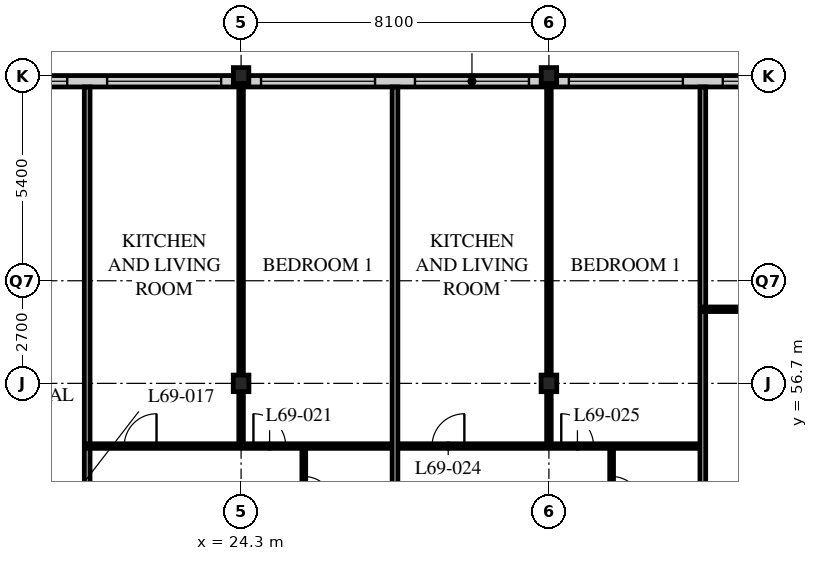
"""IFC4 building model, lengths in metres.
Left out: names, types, materials, properties, quantities, classifications, styles, units other than length and angle.
Written with IfcOpenShell. Run it as: python <this file> out.ifc"""

import sys

from ifc_helpers import new_model, si_unit, direction, frame, frame_2d, origin, origin_2d, place, context, subcontext, project, spatial, rectangle, i_section, extrude, element, fill, save


model = new_model("IFC4")
c1 = context("Model", 3, precision=1e-05, world=origin(), true_north=direction((0.0, 1.0)))
c2 = subcontext(c1, "Body", "Model", "MODEL_VIEW")
j1 = project(units=[si_unit("LENGTHUNIT", "METRE"), si_unit("PLANEANGLEUNIT", "RADIAN")], contexts=[c1])
p1 = place(None, origin())
s1 = spatial("IfcSite", under=j1, at=p1, CompositionType="ELEMENT")
p2 = place(p1, origin())
s2 = spatial("IfcBuilding", under=s1, at=p2, CompositionType="ELEMENT")
p3 = place(p2, frame((0.0, 0.0, 269.7)))
s3 = spatial("IfcBuildingStorey", under=s2, at=p3, CompositionType="ELEMENT", Elevation=269.7)
p4 = place(p3, frame((24.3, 56.7, 0.0), z_axis=(0.0, 0.0, 1.0), x_axis=(1.0, 0.0, 0.0)))
e1 = element("IfcColumn", 1, at=p4, inside=s3, PredefinedType="COLUMN", context=c2, shape_type="SweptSolid", body=[
    extrude(i_section(OverallWidth=0.412, OverallDepth=0.437, WebThickness=0.036, FlangeThickness=0.058, FilletRadius=0.015, at=origin_2d()), origin(), (0.0, 0.0, 1.0), 3.9),
])
p5 = place(p3, frame((24.3, 64.8, 0.0), z_axis=(0.0, 0.0, 1.0), x_axis=(1.0, 0.0, 0.0)))
e2 = element("IfcColumn", 2, at=p5, inside=s3, PredefinedType="COLUMN", context=c2, shape_type="SweptSolid", body=[
    extrude(i_section(OverallWidth=0.407, OverallDepth=0.419, WebThickness=0.031, FlangeThickness=0.049, FilletRadius=0.015, at=origin_2d()), origin(), (0.0, 0.0, 1.0), 3.9),
])
p6 = place(p3, frame((32.4, 56.7, 0.0), z_axis=(0.0, 0.0, 1.0), x_axis=(1.0, 0.0, 0.0)))
e3 = element("IfcColumn", 3, at=p6, inside=s3, PredefinedType="COLUMN", context=c2, shape_type="SweptSolid", body=[
    extrude(i_section(OverallWidth=0.412, OverallDepth=0.437, WebThickness=0.036, FlangeThickness=0.058, FilletRadius=0.015, at=origin_2d()), origin(), (0.0, 0.0, 1.0), 3.9),
])
p7 = place(p3, frame((32.4, 64.8, 0.0), z_axis=(0.0, 0.0, 1.0), x_axis=(1.0, 0.0, 0.0)))
e4 = element("IfcColumn", 4, at=p7, inside=s3, PredefinedType="COLUMN", context=c2, shape_type="SweptSolid", body=[
    extrude(i_section(OverallWidth=0.407, OverallDepth=0.419, WebThickness=0.031, FlangeThickness=0.049, FilletRadius=0.015, at=origin_2d()), origin(), (0.0, 0.0, 1.0), 3.9),
])
p8 = place(p3, frame((48.3, 64.65, 0.0), z_axis=(0.0, 0.0, 1.0), x_axis=(-1.0, 0.0, 0.0)))
e5 = element("IfcWall", 5, at=p8, inside=s3, PredefinedType="SOLIDWALL", context=c2, shape_type="SweptSolid", body=[
    extrude(rectangle(XDim=40.2, YDim=0.3, at=frame_2d((20.1, 0.0))), origin(), (0.0, 0.0, 1.0), 3.69),
])
p9 = place(p8, frame((0.225, 0.0, 0.6)))
e6 = element("IfcOpeningElement", 6, at=p9, cuts=e5, PredefinedType="OPENING", context=c2, shape_type="SweptSolid", body=[
    extrude(rectangle(XDim=3.0, YDim=2.4, at=frame_2d((1.5, 1.2))), frame((0.0, 0.16, 0.0), z_axis=(0.0, -1.0, 0.0), x_axis=(1.0, 0.0, 0.0)), (0.0, 0.0, 1.0), 0.32),
])
p10 = place(p8, frame((4.275, 0.0, 0.6)))
e7 = element("IfcOpeningElement", 7, at=p10, cuts=e5, PredefinedType="OPENING", context=c2, shape_type="SweptSolid", body=[
    extrude(rectangle(XDim=3.0, YDim=2.4, at=frame_2d((1.5, 1.2))), frame((0.0, 0.16, 0.0), z_axis=(0.0, -1.0, 0.0), x_axis=(1.0, 0.0, 0.0)), (0.0, 0.0, 1.0), 0.32),
])
p11 = place(p8, frame((8.325, 0.0, 0.6)))
e8 = element("IfcOpeningElement", 8, at=p11, cuts=e5, PredefinedType="OPENING", context=c2, shape_type="SweptSolid", body=[
    extrude(rectangle(XDim=3.0, YDim=2.4, at=frame_2d((1.5, 1.2))), frame((0.0, 0.16, 0.0), z_axis=(0.0, -1.0, 0.0), x_axis=(1.0, 0.0, 0.0)), (0.0, 0.0, 1.0), 0.32),
])
p12 = place(p8, frame((12.375, 0.0, 0.6)))
e9 = element("IfcOpeningElement", 9, at=p12, cuts=e5, PredefinedType="OPENING", context=c2, shape_type="SweptSolid", body=[
    extrude(rectangle(XDim=3.0, YDim=2.4, at=frame_2d((1.5, 1.2))), frame((0.0, 0.16, 0.0), z_axis=(0.0, -1.0, 0.0), x_axis=(1.0, 0.0, 0.0)), (0.0, 0.0, 1.0), 0.32),
])
p13 = place(p8, frame((16.425, 0.0, 0.6)))
e10 = element("IfcOpeningElement", 10, at=p13, cuts=e5, PredefinedType="OPENING", context=c2, shape_type="SweptSolid", body=[
    extrude(rectangle(XDim=3.0, YDim=2.4, at=frame_2d((1.5, 1.2))), frame((0.0, 0.16, 0.0), z_axis=(0.0, -1.0, 0.0), x_axis=(1.0, 0.0, 0.0)), (0.0, 0.0, 1.0), 0.32),
])
p14 = place(p8, frame((20.475, 0.0, 0.6)))
e11 = element("IfcOpeningElement", 11, at=p14, cuts=e5, PredefinedType="OPENING", context=c2, shape_type="SweptSolid", body=[
    extrude(rectangle(XDim=3.0, YDim=2.4, at=frame_2d((1.5, 1.2))), frame((0.0, 0.16, 0.0), z_axis=(0.0, -1.0, 0.0), x_axis=(1.0, 0.0, 0.0)), (0.0, 0.0, 1.0), 0.32),
])
p15 = place(p8, frame((24.525, 0.0, 0.6)))
e12 = element("IfcOpeningElement", 12, at=p15, cuts=e5, PredefinedType="OPENING", context=c2, shape_type="SweptSolid", body=[
    extrude(rectangle(XDim=3.0, YDim=2.4, at=frame_2d((1.5, 1.2))), frame((0.0, 0.16, 0.0), z_axis=(0.0, -1.0, 0.0), x_axis=(1.0, 0.0, 0.0)), (0.0, 0.0, 1.0), 0.32),
])
p16 = place(p8, frame((28.575, 0.0, 0.6)))
e13 = element("IfcOpeningElement", 13, at=p16, cuts=e5, PredefinedType="OPENING", context=c2, shape_type="SweptSolid", body=[
    extrude(rectangle(XDim=3.0, YDim=2.4, at=frame_2d((1.5, 1.2))), frame((0.0, 0.16, 0.0), z_axis=(0.0, -1.0, 0.0), x_axis=(1.0, 0.0, 0.0)), (0.0, 0.0, 1.0), 0.32),
])
p17 = place(p8, frame((32.625, 0.0, 0.6)))
e14 = element("IfcOpeningElement", 14, at=p17, cuts=e5, PredefinedType="OPENING", context=c2, shape_type="SweptSolid", body=[
    extrude(rectangle(XDim=3.0, YDim=2.4, at=frame_2d((1.5, 1.2))), frame((0.0, 0.16, 0.0), z_axis=(0.0, -1.0, 0.0), x_axis=(1.0, 0.0, 0.0)), (0.0, 0.0, 1.0), 0.32),
])
p18 = place(p8, frame((36.675, 0.0, 0.6)))
e15 = element("IfcOpeningElement", 15, at=p18, cuts=e5, PredefinedType="OPENING", context=c2, shape_type="SweptSolid", body=[
    extrude(rectangle(XDim=3.0, YDim=2.4, at=frame_2d((1.5, 1.2))), frame((0.0, 0.16, 0.0), z_axis=(0.0, -1.0, 0.0), x_axis=(1.0, 0.0, 0.0)), (0.0, 0.0, 1.0), 0.32),
])
p19 = place(p3, frame((20.25, 52.65, 0.0), z_axis=(0.0, 0.0, 1.0), x_axis=(0.0, 1.0, 0.0)))
e16 = element("IfcWall", 16, at=p19, inside=s3, PredefinedType="PARTITIONING", context=c2, shape_type="SweptSolid", body=[
    extrude(rectangle(XDim=11.85, YDim=0.15, at=frame_2d((5.925, 0.0))), origin(), (0.0, 0.0, 1.0), 3.69),
])
p20 = place(p3, frame((20.25, 55.05, 0.0), z_axis=(0.0, 0.0, 1.0), x_axis=(1.0, 0.0, 0.0)))
e17 = element("IfcWall", 17, at=p20, inside=s3, PredefinedType="PARTITIONING", context=c2, shape_type="SweptSolid", body=[
    extrude(rectangle(XDim=16.2, YDim=0.12, at=frame_2d((8.1, 0.0))), origin(), (0.0, 0.0, 1.0), 3.69),
])
p21 = place(p20, frame((0.975, 0.0, 0.0)))
e18 = element("IfcOpeningElement", 18, at=p21, cuts=e17, PredefinedType="OPENING", context=c2, shape_type="SweptSolid", body=[
    extrude(rectangle(XDim=0.85, YDim=2.1, at=frame_2d((0.425, 1.05))), frame((0.0, 0.07, 0.0), z_axis=(0.0, -1.0, 0.0), x_axis=(1.0, 0.0, 0.0)), (0.0, 0.0, 1.0), 0.14),
])
p22 = place(p20, frame((4.375, 0.0, 0.0)))
e19 = element("IfcOpeningElement", 19, at=p22, cuts=e17, PredefinedType="OPENING", context=c2, shape_type="SweptSolid", body=[
    extrude(rectangle(XDim=0.85, YDim=2.1, at=frame_2d((0.425, 1.05))), frame((0.0, 0.07, 0.0), z_axis=(0.0, -1.0, 0.0), x_axis=(1.0, 0.0, 0.0)), (0.0, 0.0, 1.0), 0.14),
])
p23 = place(p20, frame((9.075, 0.0, 0.0)))
e20 = element("IfcOpeningElement", 20, at=p23, cuts=e17, PredefinedType="OPENING", context=c2, shape_type="SweptSolid", body=[
    extrude(rectangle(XDim=0.85, YDim=2.1, at=frame_2d((0.425, 1.05))), frame((0.0, 0.07, 0.0), z_axis=(0.0, -1.0, 0.0), x_axis=(1.0, 0.0, 0.0)), (0.0, 0.0, 1.0), 0.14),
])
p24 = place(p20, frame((12.475, 0.0, 0.0)))
e21 = element("IfcOpeningElement", 21, at=p24, cuts=e17, PredefinedType="OPENING", context=c2, shape_type="SweptSolid", body=[
    extrude(rectangle(XDim=0.85, YDim=2.1, at=frame_2d((0.425, 1.05))), frame((0.0, 0.07, 0.0), z_axis=(0.0, -1.0, 0.0), x_axis=(1.0, 0.0, 0.0)), (0.0, 0.0, 1.0), 0.14),
])
p25 = place(p3, frame((25.95, 52.65, 0.0), z_axis=(0.0, 0.0, 1.0), x_axis=(0.0, 1.0, 0.0)))
e22 = element("IfcWall", 22, at=p25, inside=s3, PredefinedType="PARTITIONING", context=c2, shape_type="SweptSolid", body=[
    extrude(rectangle(XDim=2.4, YDim=0.1, at=frame_2d((1.2, 0.0))), origin(), (0.0, 0.0, 1.0), 3.69),
])
p26 = place(p25, frame((0.8, 0.0, 0.0)))
e23 = element("IfcOpeningElement", 23, at=p26, cuts=e22, PredefinedType="OPENING", context=c2, shape_type="SweptSolid", body=[
    extrude(rectangle(XDim=0.8, YDim=2.1, at=frame_2d((0.4, 1.05))), frame((0.0, 0.06, 0.0), z_axis=(0.0, -1.0, 0.0), x_axis=(1.0, 0.0, 0.0)), (0.0, 0.0, 1.0), 0.12),
])
p27 = place(p3, frame((24.3, 55.05, 0.0), z_axis=(0.0, 0.0, 1.0), x_axis=(0.0, 1.0, 0.0)))
e24 = element("IfcWall", 24, at=p27, inside=s3, PredefinedType="PARTITIONING", context=c2, shape_type="SweptSolid", body=[
    extrude(rectangle(XDim=9.45, YDim=0.12, at=frame_2d((4.725, 0.0))), origin(), (0.0, 0.0, 1.0), 3.078),
])
p28 = place(p3, frame((28.35, 52.65, 0.0), z_axis=(0.0, 0.0, 1.0), x_axis=(0.0, 1.0, 0.0)))
e25 = element("IfcWall", 25, at=p28, inside=s3, PredefinedType="PARTITIONING", context=c2, shape_type="SweptSolid", body=[
    extrude(rectangle(XDim=11.85, YDim=0.15, at=frame_2d((5.925, 0.0))), origin(), (0.0, 0.0, 1.0), 3.69),
])
p29 = place(p3, frame((34.05, 52.65, 0.0), z_axis=(0.0, 0.0, 1.0), x_axis=(0.0, 1.0, 0.0)))
e26 = element("IfcWall", 26, at=p29, inside=s3, PredefinedType="PARTITIONING", context=c2, shape_type="SweptSolid", body=[
    extrude(rectangle(XDim=2.4, YDim=0.1, at=frame_2d((1.2, 0.0))), origin(), (0.0, 0.0, 1.0), 3.69),
])
p30 = place(p29, frame((0.8, 0.0, 0.0)))
e27 = element("IfcOpeningElement", 27, at=p30, cuts=e26, PredefinedType="OPENING", context=c2, shape_type="SweptSolid", body=[
    extrude(rectangle(XDim=0.8, YDim=2.1, at=frame_2d((0.4, 1.05))), frame((0.0, 0.06, 0.0), z_axis=(0.0, -1.0, 0.0), x_axis=(1.0, 0.0, 0.0)), (0.0, 0.0, 1.0), 0.12),
])
p31 = place(p3, frame((32.4, 55.05, 0.0), z_axis=(0.0, 0.0, 1.0), x_axis=(0.0, 1.0, 0.0)))
e28 = element("IfcWall", 28, at=p31, inside=s3, PredefinedType="PARTITIONING", context=c2, shape_type="SweptSolid", body=[
    extrude(rectangle(XDim=9.45, YDim=0.12, at=frame_2d((4.725, 0.0))), origin(), (0.0, 0.0, 1.0), 3.078),
])
p32 = place(p3, frame((36.45, 64.5, 0.0), z_axis=(0.0, 0.0, 1.0), x_axis=(0.0, -1.0, 0.0)))
e29 = element("IfcWall", 29, at=p32, inside=s3, PredefinedType="PARTITIONING", context=c2, shape_type="SweptSolid", body=[
    extrude(rectangle(XDim=11.85, YDim=0.15, at=frame_2d((5.925, 0.0))), origin(), (0.0, 0.0, 1.0), 3.69),
])
p33 = place(p3, frame((36.45, 58.65, 0.0), z_axis=(0.0, 0.0, 1.0), x_axis=(1.0, 0.0, 0.0)))
e30 = element("IfcWall", 30, at=p33, inside=s3, PredefinedType="PARTITIONING", context=c2, shape_type="SweptSolid", body=[
    extrude(rectangle(XDim=15.9, YDim=0.12, at=frame_2d((7.95, 0.0))), origin(), (0.0, 0.0, 1.0), 3.69),
])
p34 = place(p33, frame((1.675, 0.0, 0.0)))
e31 = element("IfcOpeningElement", 31, at=p34, cuts=e30, PredefinedType="OPENING", context=c2, shape_type="SweptSolid", body=[
    extrude(rectangle(XDim=0.85, YDim=2.1, at=frame_2d((0.425, 1.05))), frame((0.0, 0.07, 0.0), z_axis=(0.0, -1.0, 0.0), x_axis=(1.0, 0.0, 0.0)), (0.0, 0.0, 1.0), 0.14),
])
p35 = place(p11, origin())
e32 = element("IfcWindow", 32, at=p35, inside=s3, PartitioningType="SINGLE_PANEL", PredefinedType="WINDOW", context=c2, shape_type="SweptSolid", body=[
    extrude(rectangle(XDim=3.0, YDim=2.4, at=frame_2d((1.5, 1.2))), frame((0.0, 0.03, 0.0), z_axis=(0.0, -1.0, 0.0), x_axis=(1.0, 0.0, 0.0)), (0.0, 0.0, 1.0), 0.06),
])
fill(e8, e32)
p36 = place(p12, origin())
e33 = element("IfcWindow", 33, at=p36, inside=s3, PartitioningType="SINGLE_PANEL", PredefinedType="WINDOW", context=c2, shape_type="SweptSolid", body=[
    extrude(rectangle(XDim=3.0, YDim=2.4, at=frame_2d((1.5, 1.2))), frame((0.0, 0.03, 0.0), z_axis=(0.0, -1.0, 0.0), x_axis=(1.0, 0.0, 0.0)), (0.0, 0.0, 1.0), 0.06),
])
fill(e9, e33)
p37 = place(p13, origin())
e34 = element("IfcWindow", 34, at=p37, inside=s3, PartitioningType="SINGLE_PANEL", PredefinedType="WINDOW", context=c2, shape_type="SweptSolid", body=[
    extrude(rectangle(XDim=3.0, YDim=2.4, at=frame_2d((1.5, 1.2))), frame((0.0, 0.03, 0.0), z_axis=(0.0, -1.0, 0.0), x_axis=(1.0, 0.0, 0.0)), (0.0, 0.0, 1.0), 0.06),
])
fill(e10, e34)
p38 = place(p14, origin())
e35 = element("IfcWindow", 35, at=p38, inside=s3, PartitioningType="SINGLE_PANEL", PredefinedType="WINDOW", context=c2, shape_type="SweptSolid", body=[
    extrude(rectangle(XDim=3.0, YDim=2.4, at=frame_2d((1.5, 1.2))), frame((0.0, 0.03, 0.0), z_axis=(0.0, -1.0, 0.0), x_axis=(1.0, 0.0, 0.0)), (0.0, 0.0, 1.0), 0.06),
])
fill(e11, e35)
p39 = place(p15, origin())
e36 = element("IfcWindow", 36, at=p39, inside=s3, PartitioningType="SINGLE_PANEL", PredefinedType="WINDOW", context=c2, shape_type="SweptSolid", body=[
    extrude(rectangle(XDim=3.0, YDim=2.4, at=frame_2d((1.5, 1.2))), frame((0.0, 0.03, 0.0), z_axis=(0.0, -1.0, 0.0), x_axis=(1.0, 0.0, 0.0)), (0.0, 0.0, 1.0), 0.06),
])
fill(e12, e36)
p40 = place(p16, origin())
e37 = element("IfcWindow", 37, at=p40, inside=s3, PartitioningType="SINGLE_PANEL", PredefinedType="WINDOW", context=c2, shape_type="SweptSolid", body=[
    extrude(rectangle(XDim=3.0, YDim=2.4, at=frame_2d((1.5, 1.2))), frame((0.0, 0.03, 0.0), z_axis=(0.0, -1.0, 0.0), x_axis=(1.0, 0.0, 0.0)), (0.0, 0.0, 1.0), 0.06),
])
fill(e13, e37)
p41 = place(p26, origin())
e38 = element("IfcDoor", 38, at=p41, inside=s3, OperationType="SINGLE_SWING_RIGHT", PredefinedType="DOOR", context=c2, shape_type="SweptSolid", body=[
    extrude(rectangle(XDim=0.8, YDim=2.1, at=frame_2d((0.4, 1.05))), frame((0.0, 0.025, 0.0), z_axis=(0.0, -1.0, 0.0), x_axis=(1.0, 0.0, 0.0)), (0.0, 0.0, 1.0), 0.05),
])
fill(e23, e38)
p42 = place(p21, origin())
e39 = element("IfcDoor", 39, at=p42, inside=s3, OperationType="SINGLE_SWING_RIGHT", PredefinedType="DOOR", context=c2, shape_type="SweptSolid", body=[
    extrude(rectangle(XDim=0.85, YDim=2.1, at=frame_2d((0.425, 1.05))), frame((0.0, 0.025, 0.0), z_axis=(0.0, -1.0, 0.0), x_axis=(1.0, 0.0, 0.0)), (0.0, 0.0, 1.0), 0.05),
])
fill(e18, e39)
p43 = place(p22, origin())
e40 = element("IfcDoor", 40, at=p43, inside=s3, OperationType="SINGLE_SWING_LEFT", PredefinedType="DOOR", context=c2, shape_type="SweptSolid", body=[
    extrude(rectangle(XDim=0.85, YDim=2.1, at=frame_2d((0.425, 1.05))), frame((0.0, 0.025, 0.0), z_axis=(0.0, -1.0, 0.0), x_axis=(1.0, 0.0, 0.0)), (0.0, 0.0, 1.0), 0.05),
])
fill(e19, e40)
p44 = place(p30, origin())
e41 = element("IfcDoor", 41, at=p44, inside=s3, OperationType="SINGLE_SWING_RIGHT", PredefinedType="DOOR", context=c2, shape_type="SweptSolid", body=[
    extrude(rectangle(XDim=0.8, YDim=2.1, at=frame_2d((0.4, 1.05))), frame((0.0, 0.025, 0.0), z_axis=(0.0, -1.0, 0.0), x_axis=(1.0, 0.0, 0.0)), (0.0, 0.0, 1.0), 0.05),
])
fill(e27, e41)
p45 = place(p23, origin())
e42 = element("IfcDoor", 42, at=p45, inside=s3, OperationType="SINGLE_SWING_RIGHT", PredefinedType="DOOR", context=c2, shape_type="SweptSolid", body=[
    extrude(rectangle(XDim=0.85, YDim=2.1, at=frame_2d((0.425, 1.05))), frame((0.0, 0.025, 0.0), z_axis=(0.0, -1.0, 0.0), x_axis=(1.0, 0.0, 0.0)), (0.0, 0.0, 1.0), 0.05),
])
fill(e20, e42)
p46 = place(p24, origin())
e43 = element("IfcDoor", 43, at=p46, inside=s3, OperationType="SINGLE_SWING_LEFT", PredefinedType="DOOR", context=c2, shape_type="SweptSolid", body=[
    extrude(rectangle(XDim=0.85, YDim=2.1, at=frame_2d((0.425, 1.05))), frame((0.0, 0.025, 0.0), z_axis=(0.0, -1.0, 0.0), x_axis=(1.0, 0.0, 0.0)), (0.0, 0.0, 1.0), 0.05),
])
fill(e21, e43)
save(model, sys.argv[1])
